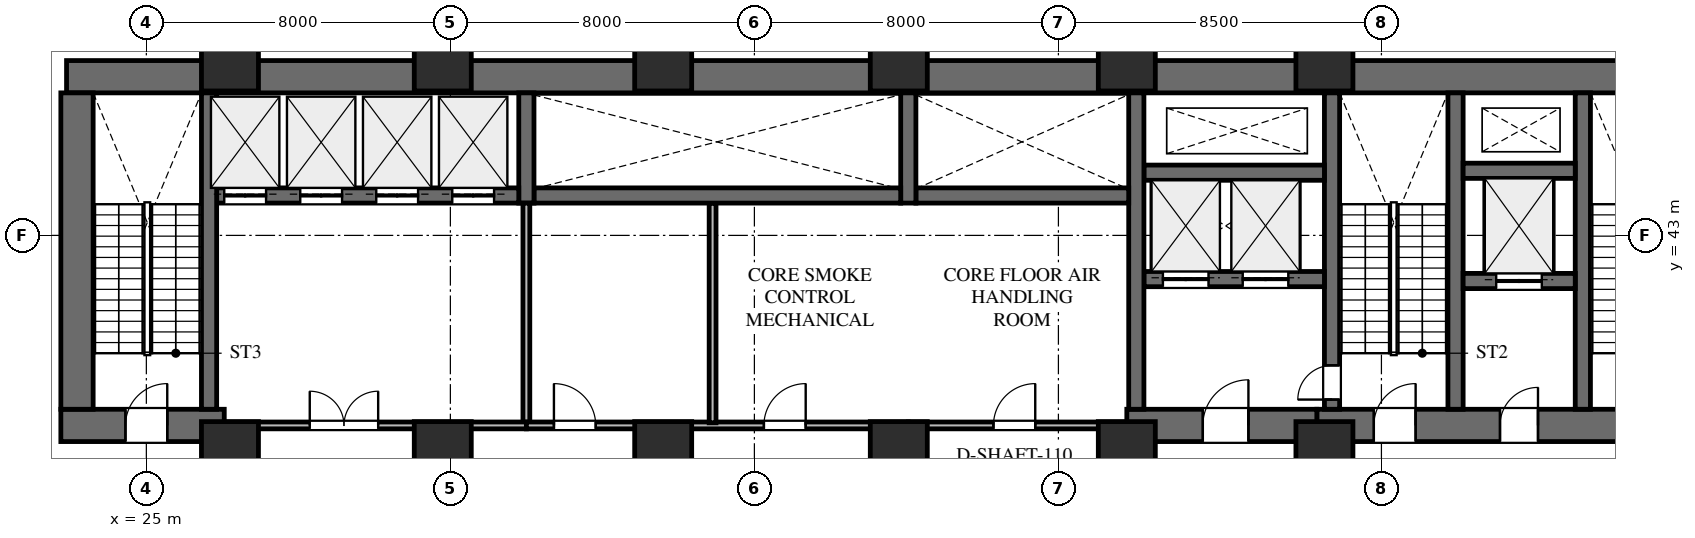
"""IFC4 building model, lengths in metres.
Left out: names, types, materials, properties, quantities, classifications, styles, units other than length and angle.
Written with IfcOpenShell. Run it as: python <this file> out.ifc"""

import sys

from ifc_helpers import new_model, si_unit, direction, frame, frame_2d, origin, origin_2d, place, context, subcontext, project, spatial, rectangle, extrude, element, fill, save


model = new_model("IFC4")
c1 = context("Model", 3, precision=1e-05, world=origin(), true_north=direction((0.0, 1.0)))
c2 = subcontext(c1, "Body", "Model", "MODEL_VIEW")
j1 = project(units=[si_unit("LENGTHUNIT", "METRE"), si_unit("PLANEANGLEUNIT", "RADIAN")], contexts=[c1])
p1 = place(None, origin())
s1 = spatial("IfcSite", under=j1, at=p1, CompositionType="ELEMENT")
p2 = place(p1, origin())
s2 = spatial("IfcBuilding", under=s1, at=p2, CompositionType="ELEMENT")
p3 = place(p2, frame((0.0, 0.0, 24.3)))
s3 = spatial("IfcBuildingStorey", under=s2, at=p3, CompositionType="ELEMENT", Elevation=24.3)
p4 = place(p3, frame((22.9, 47.175, 0.0), z_axis=(0.0, 0.0, 1.0), x_axis=(1.0, 0.0, 0.0)))
e1 = element("IfcWall", 1, at=p4, inside=s3, PredefinedType="SHEAR", context=c2, shape_type="SweptSolid", body=[
    extrude(rectangle(XDim=43.8, YDim=0.85, at=frame_2d((21.9, 0.0))), origin(), (0.0, 0.0, 1.0), 5.2),
])
p5 = place(p3, frame((55.8, 38.0, 0.0), z_axis=(0.0, 0.0, 1.0), x_axis=(1.0, 0.0, 0.0)))
e2 = element("IfcWall", 2, at=p5, inside=s3, PredefinedType="SHEAR", context=c2, shape_type="SweptSolid", body=[
    extrude(rectangle(XDim=10.9, YDim=0.85, at=frame_2d((5.45, 0.0))), origin(), (0.0, 0.0, 1.0), 5.2),
])
p6 = place(p5, frame((1.5, 0.0, 0.0)))
e3 = element("IfcOpeningElement", 3, at=p6, cuts=e2, PredefinedType="OPENING", context=c2, shape_type="SweptSolid", body=[
    extrude(rectangle(XDim=1.1, YDim=2.2, at=frame_2d((0.55, 1.1))), frame((0.0, 0.435, 0.0), z_axis=(0.0, -1.0, 0.0), x_axis=(1.0, 0.0, 0.0)), (0.0, 0.0, 1.0), 0.87),
])
p7 = place(p5, frame((4.82, 0.0, 0.0)))
e4 = element("IfcOpeningElement", 4, at=p7, cuts=e2, PredefinedType="OPENING", context=c2, shape_type="SweptSolid", body=[
    extrude(rectangle(XDim=1.0, YDim=2.15, at=frame_2d((0.5, 1.075))), frame((0.0, 0.435, 0.0), z_axis=(0.0, -1.0, 0.0), x_axis=(1.0, 0.0, 0.0)), (0.0, 0.0, 1.0), 0.87),
])
p8 = place(p5, frame((8.05, 0.0, 0.0)))
e5 = element("IfcOpeningElement", 5, at=p8, cuts=e2, PredefinedType="OPENING", context=c2, shape_type="SweptSolid", body=[
    extrude(rectangle(XDim=1.1, YDim=2.2, at=frame_2d((0.55, 1.1))), frame((0.0, 0.435, 0.0), z_axis=(0.0, -1.0, 0.0), x_axis=(1.0, 0.0, 0.0)), (0.0, 0.0, 1.0), 0.87),
])
for number, where, z_axis, x_axis in (
    (6, (62.8, 38.425, 0.0), (0.0, 0.0, 1.0), (0.0, 1.0, 0.0)),
    (7, (59.45, 38.425, 0.0), (0.0, 0.0, 1.0), (0.0, 1.0, 0.0)),
):
    element("IfcWall", number, at=place(p3, frame(where, z_axis=z_axis, x_axis=x_axis)), inside=s3, PredefinedType="SHEAR", context=c2, shape_type="SweptSolid", body=[
        extrude(rectangle(XDim=8.325, YDim=0.4, at=frame_2d((4.163, 0.0))), origin(), (0.0, 0.0, 1.0), 5.2),
    ])
p9 = place(p3, frame((56.2, 38.425, 0.0), z_axis=(0.0, 0.0, 1.0), x_axis=(0.0, 1.0, 0.0)))
e8 = element("IfcWall", 8, at=p9, inside=s3, PredefinedType="SHEAR", context=c2, shape_type="SweptSolid", body=[
    extrude(rectangle(XDim=8.325, YDim=0.4, at=frame_2d((4.163, 0.0))), origin(), (0.0, 0.0, 1.0), 5.2),
])
p10 = place(p9, frame((0.255, 0.0, 0.0)))
e9 = element("IfcOpeningElement", 9, at=p10, cuts=e8, PredefinedType="OPENING", context=c2, shape_type="SweptSolid", body=[
    extrude(rectangle(XDim=0.9, YDim=2.15, at=frame_2d((0.45, 1.075))), frame((0.0, 0.21, 0.0), z_axis=(0.0, -1.0, 0.0), x_axis=(1.0, 0.0, 0.0)), (0.0, 0.0, 1.0), 0.42),
])
p11 = place(p3, frame((59.65, 41.8, 0.0), z_axis=(0.0, 0.0, 1.0), x_axis=(1.0, 0.0, 0.0)))
e10 = element("IfcWall", 10, at=p11, inside=s3, PredefinedType="SHEAR", context=c2, shape_type="SweptSolid", body=[
    extrude(rectangle(XDim=2.95, YDim=0.4, at=frame_2d((1.475, 0.0))), origin(), (0.0, 0.0, 1.0), 5.2),
])
p12 = place(p11, frame((0.87, 0.0, 0.0)))
e11 = element("IfcOpeningElement", 11, at=p12, cuts=e10, PredefinedType="OPENING", context=c2, shape_type="SweptSolid", body=[
    extrude(rectangle(XDim=1.2, YDim=2.2, at=frame_2d((0.6, 1.1))), frame((0.0, 0.21, 0.0), z_axis=(0.0, -1.0, 0.0), x_axis=(1.0, 0.0, 0.0)), (0.0, 0.0, 1.0), 0.42),
])
p13 = place(p3, frame((59.65, 44.7, 0.0), z_axis=(0.0, 0.0, 1.0), x_axis=(1.0, 0.0, 0.0)))
e12 = element("IfcWall", 12, at=p13, inside=s3, PredefinedType="SHEAR", context=c2, shape_type="SweptSolid", body=[
    extrude(rectangle(XDim=2.95, YDim=0.4, at=frame_2d((1.475, 0.0))), origin(), (0.0, 0.0, 1.0), 5.2),
])
p14 = place(p3, frame((50.8, 38.0, 0.0), z_axis=(0.0, 0.0, 1.0), x_axis=(1.0, 0.0, 0.0)))
e13 = element("IfcWall", 13, at=p14, inside=s3, PredefinedType="SHEAR", context=c2, shape_type="SweptSolid", body=[
    extrude(rectangle(XDim=5.0, YDim=0.85, at=frame_2d((2.5, 0.0))), origin(), (0.0, 0.0, 1.0), 5.2),
])
p15 = place(p14, frame((2.0, 0.0, 0.0)))
e14 = element("IfcOpeningElement", 14, at=p15, cuts=e13, PredefinedType="OPENING", context=c2, shape_type="SweptSolid", body=[
    extrude(rectangle(XDim=1.2, YDim=2.2, at=frame_2d((0.6, 1.1))), frame((0.0, 0.435, 0.0), z_axis=(0.0, -1.0, 0.0), x_axis=(1.0, 0.0, 0.0)), (0.0, 0.0, 1.0), 0.87),
])
p16 = place(p3, frame((51.25, 41.85, 0.0), z_axis=(0.0, 0.0, 1.0), x_axis=(1.0, 0.0, 0.0)))
e15 = element("IfcWall", 15, at=p16, inside=s3, PredefinedType="SHEAR", context=c2, shape_type="SweptSolid", body=[
    extrude(rectangle(XDim=4.75, YDim=0.4, at=frame_2d((2.375, 0.0))), origin(), (0.0, 0.0, 1.0), 5.2),
])
p17 = place(p16, frame((0.5, 0.0, 0.0)))
e16 = element("IfcOpeningElement", 16, at=p17, cuts=e15, PredefinedType="OPENING", context=c2, shape_type="SweptSolid", body=[
    extrude(rectangle(XDim=1.2, YDim=2.2, at=frame_2d((0.6, 1.1))), frame((0.0, 0.21, 0.0), z_axis=(0.0, -1.0, 0.0), x_axis=(1.0, 0.0, 0.0)), (0.0, 0.0, 1.0), 0.42),
])
p18 = place(p16, frame((2.6, 0.0, 0.0)))
e17 = element("IfcOpeningElement", 17, at=p18, cuts=e15, PredefinedType="OPENING", context=c2, shape_type="SweptSolid", body=[
    extrude(rectangle(XDim=1.2, YDim=2.2, at=frame_2d((0.6, 1.1))), frame((0.0, 0.21, 0.0), z_axis=(0.0, -1.0, 0.0), x_axis=(1.0, 0.0, 0.0)), (0.0, 0.0, 1.0), 0.42),
])
p19 = place(p3, frame((51.25, 44.65, 0.0), z_axis=(0.0, 0.0, 1.0), x_axis=(1.0, 0.0, 0.0)))
e18 = element("IfcWall", 18, at=p19, inside=s3, PredefinedType="SHEAR", context=c2, shape_type="SweptSolid", body=[
    extrude(rectangle(XDim=4.75, YDim=0.4, at=frame_2d((2.375, 0.0))), origin(), (0.0, 0.0, 1.0), 5.2),
])
p20 = place(p3, frame((51.05, 38.425, 0.0), z_axis=(0.0, 0.0, 1.0), x_axis=(0.0, 1.0, 0.0)))
e19 = element("IfcWall", 19, at=p20, inside=s3, PredefinedType="SHEAR", context=c2, shape_type="SweptSolid", body=[
    extrude(rectangle(XDim=8.325, YDim=0.4, at=frame_2d((4.163, 0.0))), origin(), (0.0, 0.0, 1.0), 5.2),
])
p21 = place(p3, frame((45.25, 44.05, 0.0), z_axis=(0.0, 0.0, 1.0), x_axis=(1.0, 0.0, 0.0)))
e20 = element("IfcWall", 20, at=p21, inside=s3, PredefinedType="SHEAR", context=c2, shape_type="SweptSolid", body=[
    extrude(rectangle(XDim=5.6, YDim=0.4, at=frame_2d((2.8, 0.0))), origin(), (0.0, 0.0, 1.0), 5.2),
])
p22 = place(p3, frame((45.05, 43.85, 0.0), z_axis=(0.0, 0.0, 1.0), x_axis=(0.0, 1.0, 0.0)))
e21 = element("IfcWall", 21, at=p22, inside=s3, PredefinedType="SHEAR", context=c2, shape_type="SweptSolid", body=[
    extrude(rectangle(XDim=2.9, YDim=0.4, at=frame_2d((1.45, 0.0))), origin(), (0.0, 0.0, 1.0), 5.2),
])
p23 = place(p3, frame((35.2, 44.05, 0.0), z_axis=(0.0, 0.0, 1.0), x_axis=(1.0, 0.0, 0.0)))
e22 = element("IfcWall", 22, at=p23, inside=s3, PredefinedType="SHEAR", context=c2, shape_type="SweptSolid", body=[
    extrude(rectangle(XDim=9.65, YDim=0.4, at=frame_2d((4.825, 0.0))), origin(), (0.0, 0.0, 1.0), 5.2),
])
p24 = place(p3, frame((35.0, 43.85, 0.0), z_axis=(0.0, 0.0, 1.0), x_axis=(0.0, 1.0, 0.0)))
e23 = element("IfcWall", 23, at=p24, inside=s3, PredefinedType="SHEAR", context=c2, shape_type="SweptSolid", body=[
    extrude(rectangle(XDim=2.9, YDim=0.4, at=frame_2d((1.45, 0.0))), origin(), (0.0, 0.0, 1.0), 5.2),
])
p25 = place(p3, frame((26.85, 44.05, 0.0), z_axis=(0.0, 0.0, 1.0), x_axis=(1.0, 0.0, 0.0)))
e24 = element("IfcWall", 24, at=p25, inside=s3, PredefinedType="SHEAR", context=c2, shape_type="SweptSolid", body=[
    extrude(rectangle(XDim=7.95, YDim=0.4, at=frame_2d((3.975, 0.0))), origin(), (0.0, 0.0, 1.0), 5.2),
])
p26 = place(p25, frame((0.2, 0.0, 0.0)))
e25 = element("IfcOpeningElement", 25, at=p26, cuts=e24, PredefinedType="OPENING", context=c2, shape_type="SweptSolid", body=[
    extrude(rectangle(XDim=1.1, YDim=2.2, at=frame_2d((0.55, 1.1))), frame((0.0, 0.21, 0.0), z_axis=(0.0, -1.0, 0.0), x_axis=(1.0, 0.0, 0.0)), (0.0, 0.0, 1.0), 0.42),
])
p27 = place(p25, frame((2.2, 0.0, 0.0)))
e26 = element("IfcOpeningElement", 26, at=p27, cuts=e24, PredefinedType="OPENING", context=c2, shape_type="SweptSolid", body=[
    extrude(rectangle(XDim=1.1, YDim=2.2, at=frame_2d((0.55, 1.1))), frame((0.0, 0.21, 0.0), z_axis=(0.0, -1.0, 0.0), x_axis=(1.0, 0.0, 0.0)), (0.0, 0.0, 1.0), 0.42),
])
p28 = place(p25, frame((4.2, 0.0, 0.0)))
e27 = element("IfcOpeningElement", 27, at=p28, cuts=e24, PredefinedType="OPENING", context=c2, shape_type="SweptSolid", body=[
    extrude(rectangle(XDim=1.1, YDim=2.2, at=frame_2d((0.55, 1.1))), frame((0.0, 0.21, 0.0), z_axis=(0.0, -1.0, 0.0), x_axis=(1.0, 0.0, 0.0)), (0.0, 0.0, 1.0), 0.42),
])
p29 = place(p25, frame((6.2, 0.0, 0.0)))
e28 = element("IfcOpeningElement", 28, at=p29, cuts=e24, PredefinedType="OPENING", context=c2, shape_type="SweptSolid", body=[
    extrude(rectangle(XDim=1.1, YDim=2.2, at=frame_2d((0.55, 1.1))), frame((0.0, 0.21, 0.0), z_axis=(0.0, -1.0, 0.0), x_axis=(1.0, 0.0, 0.0)), (0.0, 0.0, 1.0), 0.42),
])
p30 = place(p3, frame((22.75, 38.0, 0.0), z_axis=(0.0, 0.0, 1.0), x_axis=(1.0, 0.0, 0.0)))
e29 = element("IfcWall", 29, at=p30, inside=s3, PredefinedType="SHEAR", context=c2, shape_type="SweptSolid", body=[
    extrude(rectangle(XDim=4.3, YDim=0.85, at=frame_2d((2.15, 0.0))), origin(), (0.0, 0.0, 1.0), 5.2),
])
p31 = place(p30, frame((1.7, 0.0, 0.0)))
e30 = element("IfcOpeningElement", 30, at=p31, cuts=e29, PredefinedType="OPENING", context=c2, shape_type="SweptSolid", body=[
    extrude(rectangle(XDim=1.1, YDim=2.2, at=frame_2d((0.55, 1.1))), frame((0.0, 0.435, 0.0), z_axis=(0.0, -1.0, 0.0), x_axis=(1.0, 0.0, 0.0)), (0.0, 0.0, 1.0), 0.87),
])
p32 = place(p3, frame((23.175, 38.425, 0.0), z_axis=(0.0, 0.0, 1.0), x_axis=(0.0, 1.0, 0.0)))
e31 = element("IfcWall", 31, at=p32, inside=s3, PredefinedType="SHEAR", context=c2, shape_type="SweptSolid", body=[
    extrude(rectangle(XDim=8.325, YDim=0.85, at=frame_2d((4.163, 0.0))), origin(), (0.0, 0.0, 1.0), 5.2),
])
p33 = place(p3, frame((26.65, 38.425, 0.0), z_axis=(0.0, 0.0, 1.0), x_axis=(0.0, 1.0, 0.0)))
e32 = element("IfcWall", 32, at=p33, inside=s3, PredefinedType="SHEAR", context=c2, shape_type="SweptSolid", body=[
    extrude(rectangle(XDim=8.325, YDim=0.4, at=frame_2d((4.163, 0.0))), origin(), (0.0, 0.0, 1.0), 5.2),
])
for number, where, z_axis, x_axis in (
    (33, (56.0, 47.55, 0.0), (0.0, 0.0, 1.0), (1.0, 0.0, 0.0)),
    (34, (56.0, 37.35, 0.0), (0.0, 0.0, 1.0), (1.0, 0.0, 0.0)),
    (35, (50.8, 47.55, 0.0), (0.0, 0.0, 1.0), (1.0, 0.0, 0.0)),
    (36, (50.8, 37.35, 0.0), (0.0, 0.0, 1.0), (1.0, 0.0, 0.0)),
    (37, (44.8, 37.35, 0.0), (0.0, 0.0, 1.0), (1.0, 0.0, 0.0)),
    (38, (44.8, 47.55, 0.0), (0.0, 0.0, 1.0), (1.0, 0.0, 0.0)),
    (39, (38.6, 37.35, 0.0), (0.0, 0.0, 1.0), (1.0, 0.0, 0.0)),
    (40, (38.6, 47.55, 0.0), (0.0, 0.0, 1.0), (1.0, 0.0, 0.0)),
    (41, (32.8, 37.35, 0.0), (0.0, 0.0, 1.0), (1.0, 0.0, 0.0)),
    (42, (32.8, 47.55, 0.0), (0.0, 0.0, 1.0), (1.0, 0.0, 0.0)),
    (43, (27.2, 37.35, 0.0), (0.0, 0.0, 1.0), (1.0, 0.0, 0.0)),
    (44, (27.2, 47.55, 0.0), (0.0, 0.0, 1.0), (1.0, 0.0, 0.0)),
):
    element("IfcColumn", number, at=place(p3, frame(where, z_axis=z_axis, x_axis=x_axis)), inside=s3, PredefinedType="COLUMN", context=c2, shape_type="SweptSolid", body=[
        extrude(rectangle(XDim=1.5, YDim=1.5, at=origin_2d()), origin(), (0.0, 0.0, 1.0), 5.2),
    ])
p34 = place(p3, frame((45.05, 38.0, 0.0), z_axis=(0.0, 0.0, 1.0), x_axis=(1.0, 0.0, 0.0)))
e45 = element("IfcWall", 45, at=p34, inside=s3, PredefinedType="STANDARD", context=c2, shape_type="SweptSolid", body=[
    extrude(rectangle(XDim=5.75, YDim=0.18, at=frame_2d((2.875, 0.0))), origin(), (0.0, 0.0, 1.0), 3.992),
])
p35 = place(p34, frame((2.24, 0.0, 0.0)))
e46 = element("IfcOpeningElement", 46, at=p35, cuts=e45, PredefinedType="OPENING", context=c2, shape_type="SweptSolid", body=[
    extrude(rectangle(XDim=1.1, YDim=2.2, at=frame_2d((0.55, 1.1))), frame((0.0, 0.1, 0.0), z_axis=(0.0, -1.0, 0.0), x_axis=(1.0, 0.0, 0.0)), (0.0, 0.0, 1.0), 0.2),
])
p36 = place(p3, frame((35.0, 38.0, 0.0), z_axis=(0.0, 0.0, 1.0), x_axis=(0.0, 1.0, 0.0)))
e47 = element("IfcWall", 47, at=p36, inside=s3, PredefinedType="STANDARD", context=c2, shape_type="SweptSolid", body=[
    extrude(rectangle(XDim=5.85, YDim=0.18, at=frame_2d((2.925, 0.0))), origin(), (0.0, 0.0, 1.0), 4.94),
])
p37 = place(p3, frame((27.05, 38.0, 0.0), z_axis=(0.0, 0.0, 1.0), x_axis=(1.0, 0.0, 0.0)))
e48 = element("IfcWall", 48, at=p37, inside=s3, PredefinedType="STANDARD", context=c2, shape_type="SweptSolid", body=[
    extrude(rectangle(XDim=7.95, YDim=0.18, at=frame_2d((3.975, 0.0))), origin(), (0.0, 0.0, 1.0), 3.14),
])
p38 = place(p37, frame((2.25, 0.0, 0.0)))
e49 = element("IfcOpeningElement", 49, at=p38, cuts=e48, PredefinedType="OPENING", context=c2, shape_type="SweptSolid", body=[
    extrude(rectangle(XDim=1.8, YDim=2.2, at=frame_2d((0.9, 1.1))), frame((0.0, 0.1, 0.0), z_axis=(0.0, -1.0, 0.0), x_axis=(1.0, 0.0, 0.0)), (0.0, 0.0, 1.0), 0.2),
])
p39 = place(p3, frame((35.0, 38.0, 0.0), z_axis=(0.0, 0.0, 1.0), x_axis=(1.0, 0.0, 0.0)))
e50 = element("IfcWall", 50, at=p39, inside=s3, PredefinedType="STANDARD", context=c2, shape_type="SweptSolid", body=[
    extrude(rectangle(XDim=10.05, YDim=0.18, at=frame_2d((5.025, 0.0))), origin(), (0.0, 0.0, 1.0), 3.992),
])
p40 = place(p39, frame((0.725, 0.0, 0.0)))
e51 = element("IfcOpeningElement", 51, at=p40, cuts=e50, PredefinedType="OPENING", context=c2, shape_type="SweptSolid", body=[
    extrude(rectangle(XDim=1.1, YDim=2.2, at=frame_2d((0.55, 1.1))), frame((0.0, 0.1, 0.0), z_axis=(0.0, -1.0, 0.0), x_axis=(1.0, 0.0, 0.0)), (0.0, 0.0, 1.0), 0.2),
])
p41 = place(p39, frame((6.25, 0.0, 0.0)))
e52 = element("IfcOpeningElement", 52, at=p41, cuts=e50, PredefinedType="OPENING", context=c2, shape_type="SweptSolid", body=[
    extrude(rectangle(XDim=1.1, YDim=2.2, at=frame_2d((0.55, 1.1))), frame((0.0, 0.1, 0.0), z_axis=(0.0, -1.0, 0.0), x_axis=(1.0, 0.0, 0.0)), (0.0, 0.0, 1.0), 0.2),
])
p42 = place(p3, frame((39.9, 38.068, 0.0), z_axis=(0.0, 0.0, 1.0), x_axis=(0.0, 1.0, 0.0)))
e53 = element("IfcWall", 53, at=p42, inside=s3, PredefinedType="STANDARD", context=c2, shape_type="SweptSolid", body=[
    extrude(rectangle(XDim=5.774, YDim=0.18, at=frame_2d((2.887, 0.0))), origin(), (0.0, 0.0, 1.0), 4.94),
])
p43 = place(p6, origin())
e54 = element("IfcDoor", 54, at=p43, inside=s3, OperationType="SINGLE_SWING_RIGHT", PredefinedType="DOOR", context=c2, shape_type="SweptSolid", body=[
    extrude(rectangle(XDim=1.1, YDim=2.2, at=frame_2d((0.55, 1.1))), frame((0.0, 0.025, 0.0), z_axis=(0.0, -1.0, 0.0), x_axis=(1.0, 0.0, 0.0)), (0.0, 0.0, 1.0), 0.05),
])
fill(e3, e54)
p44 = place(p7, origin())
e55 = element("IfcDoor", 55, at=p44, inside=s3, OperationType="SINGLE_SWING_RIGHT", PredefinedType="DOOR", context=c2, shape_type="SweptSolid", body=[
    extrude(rectangle(XDim=1.0, YDim=2.15, at=frame_2d((0.5, 1.075))), frame((0.0, 0.025, 0.0), z_axis=(0.0, -1.0, 0.0), x_axis=(1.0, 0.0, 0.0)), (0.0, 0.0, 1.0), 0.05),
])
fill(e4, e55)
p45 = place(p15, origin())
e56 = element("IfcDoor", 56, at=p45, inside=s3, OperationType="SINGLE_SWING_RIGHT", PredefinedType="DOOR", context=c2, shape_type="SweptSolid", body=[
    extrude(rectangle(XDim=1.2, YDim=2.2, at=frame_2d((0.6, 1.1))), frame((0.0, 0.025, 0.0), z_axis=(0.0, -1.0, 0.0), x_axis=(1.0, 0.0, 0.0)), (0.0, 0.0, 1.0), 0.05),
])
fill(e14, e56)
p46 = place(p10, origin())
e57 = element("IfcDoor", 57, at=p46, inside=s3, OperationType="SINGLE_SWING_LEFT", PredefinedType="DOOR", context=c2, shape_type="SweptSolid", body=[
    extrude(rectangle(XDim=0.9, YDim=2.15, at=frame_2d((0.45, 1.075))), frame((0.0, 0.025, 0.0), z_axis=(0.0, -1.0, 0.0), x_axis=(1.0, 0.0, 0.0)), (0.0, 0.0, 1.0), 0.05),
])
fill(e9, e57)
p47 = place(p31, origin())
e58 = element("IfcDoor", 58, at=p47, inside=s3, OperationType="SINGLE_SWING_RIGHT", PredefinedType="DOOR", context=c2, shape_type="SweptSolid", body=[
    extrude(rectangle(XDim=1.1, YDim=2.2, at=frame_2d((0.55, 1.1))), frame((0.0, 0.025, 0.0), z_axis=(0.0, -1.0, 0.0), x_axis=(1.0, 0.0, 0.0)), (0.0, 0.0, 1.0), 0.05),
])
fill(e30, e58)
p48 = place(p26, origin())
e59 = element("IfcDoor", 59, at=p48, inside=s3, OperationType="DOUBLE_DOOR_SLIDING", PredefinedType="DOOR", context=c2, shape_type="SweptSolid", body=[
    extrude(rectangle(XDim=1.1, YDim=2.2, at=frame_2d((0.55, 1.1))), frame((0.0, 0.025, 0.0), z_axis=(0.0, -1.0, 0.0), x_axis=(1.0, 0.0, 0.0)), (0.0, 0.0, 1.0), 0.05),
])
fill(e25, e59)
p49 = place(p27, origin())
e60 = element("IfcDoor", 60, at=p49, inside=s3, OperationType="DOUBLE_DOOR_SLIDING", PredefinedType="DOOR", context=c2, shape_type="SweptSolid", body=[
    extrude(rectangle(XDim=1.1, YDim=2.2, at=frame_2d((0.55, 1.1))), frame((0.0, 0.025, 0.0), z_axis=(0.0, -1.0, 0.0), x_axis=(1.0, 0.0, 0.0)), (0.0, 0.0, 1.0), 0.05),
])
fill(e26, e60)
p50 = place(p28, origin())
e61 = element("IfcDoor", 61, at=p50, inside=s3, OperationType="DOUBLE_DOOR_SLIDING", PredefinedType="DOOR", context=c2, shape_type="SweptSolid", body=[
    extrude(rectangle(XDim=1.1, YDim=2.2, at=frame_2d((0.55, 1.1))), frame((0.0, 0.025, 0.0), z_axis=(0.0, -1.0, 0.0), x_axis=(1.0, 0.0, 0.0)), (0.0, 0.0, 1.0), 0.05),
])
fill(e27, e61)
p51 = place(p29, origin())
e62 = element("IfcDoor", 62, at=p51, inside=s3, OperationType="DOUBLE_DOOR_SLIDING", PredefinedType="DOOR", context=c2, shape_type="SweptSolid", body=[
    extrude(rectangle(XDim=1.1, YDim=2.2, at=frame_2d((0.55, 1.1))), frame((0.0, 0.025, 0.0), z_axis=(0.0, -1.0, 0.0), x_axis=(1.0, 0.0, 0.0)), (0.0, 0.0, 1.0), 0.05),
])
fill(e28, e62)
p52 = place(p17, origin())
e63 = element("IfcDoor", 63, at=p52, inside=s3, OperationType="DOUBLE_DOOR_SLIDING", PredefinedType="DOOR", context=c2, shape_type="SweptSolid", body=[
    extrude(rectangle(XDim=1.2, YDim=2.2, at=frame_2d((0.6, 1.1))), frame((0.0, 0.025, 0.0), z_axis=(0.0, -1.0, 0.0), x_axis=(1.0, 0.0, 0.0)), (0.0, 0.0, 1.0), 0.05),
])
fill(e16, e63)
p53 = place(p18, origin())
e64 = element("IfcDoor", 64, at=p53, inside=s3, OperationType="DOUBLE_DOOR_SLIDING", PredefinedType="DOOR", context=c2, shape_type="SweptSolid", body=[
    extrude(rectangle(XDim=1.2, YDim=2.2, at=frame_2d((0.6, 1.1))), frame((0.0, 0.025, 0.0), z_axis=(0.0, -1.0, 0.0), x_axis=(1.0, 0.0, 0.0)), (0.0, 0.0, 1.0), 0.05),
])
fill(e17, e64)
p54 = place(p12, origin())
e65 = element("IfcDoor", 65, at=p54, inside=s3, OperationType="DOUBLE_DOOR_SLIDING", PredefinedType="DOOR", context=c2, shape_type="SweptSolid", body=[
    extrude(rectangle(XDim=1.2, YDim=2.2, at=frame_2d((0.6, 1.1))), frame((0.0, 0.025, 0.0), z_axis=(0.0, -1.0, 0.0), x_axis=(1.0, 0.0, 0.0)), (0.0, 0.0, 1.0), 0.05),
])
fill(e11, e65)
p55 = place(p35, origin())
e66 = element("IfcDoor", 66, at=p55, inside=s3, OperationType="SINGLE_SWING_RIGHT", PredefinedType="DOOR", context=c2, shape_type="SweptSolid", body=[
    extrude(rectangle(XDim=1.1, YDim=2.2, at=frame_2d((0.55, 1.1))), frame((0.0, 0.025, 0.0), z_axis=(0.0, -1.0, 0.0), x_axis=(1.0, 0.0, 0.0)), (0.0, 0.0, 1.0), 0.05),
])
fill(e46, e66)
p56 = place(p38, origin())
e67 = element("IfcDoor", 67, at=p56, inside=s3, OperationType="DOUBLE_DOOR_SINGLE_SWING", PredefinedType="DOOR", context=c2, shape_type="SweptSolid", body=[
    extrude(rectangle(XDim=1.8, YDim=2.2, at=frame_2d((0.9, 1.1))), frame((0.0, 0.025, 0.0), z_axis=(0.0, -1.0, 0.0), x_axis=(1.0, 0.0, 0.0)), (0.0, 0.0, 1.0), 0.05),
])
fill(e49, e67)
p57 = place(p40, origin())
e68 = element("IfcDoor", 68, at=p57, inside=s3, OperationType="SINGLE_SWING_LEFT", PredefinedType="DOOR", context=c2, shape_type="SweptSolid", body=[
    extrude(rectangle(XDim=1.1, YDim=2.2, at=frame_2d((0.55, 1.1))), frame((0.0, 0.025, 0.0), z_axis=(0.0, -1.0, 0.0), x_axis=(1.0, 0.0, 0.0)), (0.0, 0.0, 1.0), 0.05),
])
fill(e51, e68)
p58 = place(p41, origin())
e69 = element("IfcDoor", 69, at=p58, inside=s3, OperationType="SINGLE_SWING_RIGHT", PredefinedType="DOOR", context=c2, shape_type="SweptSolid", body=[
    extrude(rectangle(XDim=1.1, YDim=2.2, at=frame_2d((0.55, 1.1))), frame((0.0, 0.025, 0.0), z_axis=(0.0, -1.0, 0.0), x_axis=(1.0, 0.0, 0.0)), (0.0, 0.0, 1.0), 0.05),
])
fill(e52, e69)
save(model, sys.argv[1])
